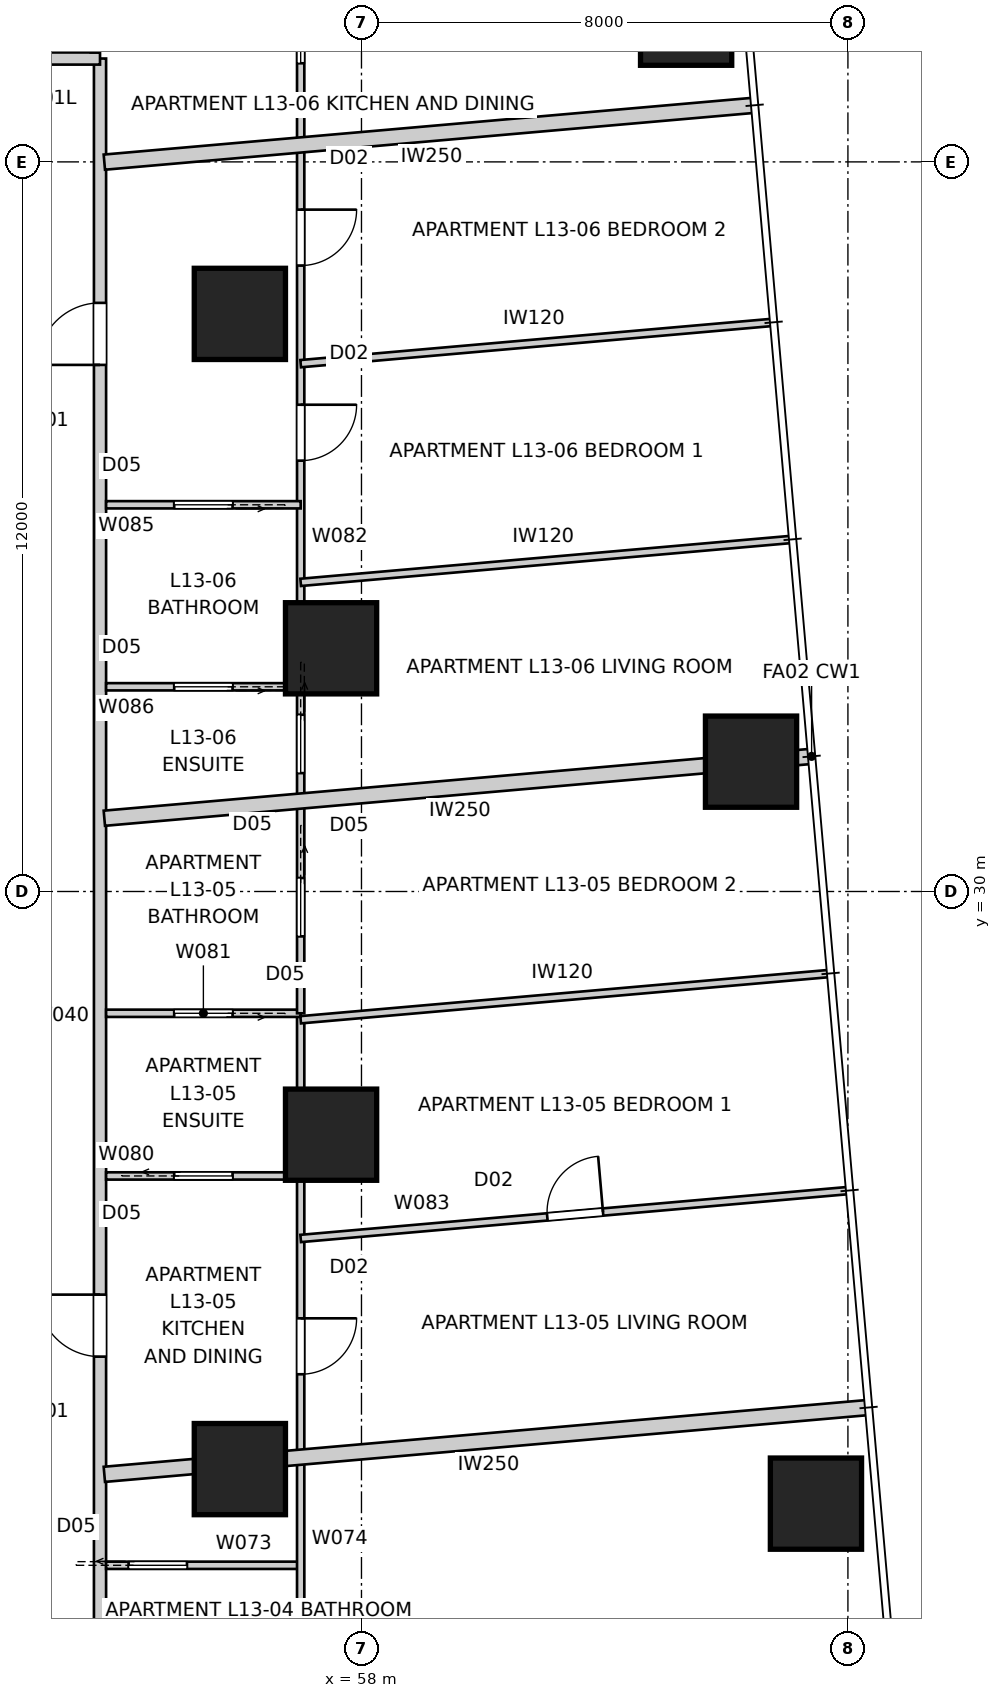
"""IFC4 building model, lengths in metres.
Left out: names, types, materials, properties, quantities, classifications, styles, units other than length and angle.
Written with IfcOpenShell. Run it as: python <this file> out.ifc"""

import sys

from ifc_helpers import new_model, si_unit, direction, frame, frame_2d, origin, origin_2d, place, context, subcontext, project, spatial, rectangle, extrude, element, fill, save


model = new_model("IFC4")
c1 = context("Model", 3, precision=1e-05, world=origin(), true_north=direction((0.0, 1.0)))
c2 = subcontext(c1, "Body", "Model", "MODEL_VIEW")
j1 = project(units=[si_unit("LENGTHUNIT", "METRE"), si_unit("PLANEANGLEUNIT", "RADIAN")], contexts=[c1])
p1 = place(None, origin())
s1 = spatial("IfcSite", under=j1, at=p1, CompositionType="ELEMENT")
p2 = place(p1, origin())
s2 = spatial("IfcBuilding", under=s1, at=p2, CompositionType="ELEMENT")
p3 = place(p2, frame((0.0, 0.0, 50.6)))
s3 = spatial("IfcBuildingStorey", under=s2, at=p3, CompositionType="ELEMENT", Elevation=50.6)
for number, where, z_axis, x_axis in (
    (1, (65.474, 19.932, 0.0), (0.0, 0.0, 1.0), (1.0, 0.0, 0.0)),
    (2, (64.407, 32.135, 0.0), (0.0, 0.0, 1.0), (1.0, 0.0, 0.0)),
    (3, (63.339, 44.339, 0.0), (0.0, 0.0, 1.0), (1.0, 0.0, 0.0)),
    (4, (57.5, 26.0, 0.0), (0.0, 0.0, 1.0), (1.0, 0.0, 0.0)),
    (5, (57.5, 34.0, 0.0), (0.0, 0.0, 1.0), (1.0, 0.0, 0.0)),
    (6, (56.0, 39.5, 0.0), (0.0, 0.0, 1.0), (1.0, 0.0, 0.0)),
    (7, (56.0, 20.5, 0.0), (0.0, 0.0, 1.0), (1.0, 0.0, 0.0)),
):
    element("IfcColumn", number, at=place(p3, frame(where, z_axis=z_axis, x_axis=x_axis)), inside=s3, PredefinedType="COLUMN", context=c2, shape_type="SweptSolid", body=[
        extrude(rectangle(XDim=1.5, YDim=1.5, at=origin_2d()), origin(), (0.0, 0.0, 1.0), 3.4),
    ])
p4 = place(p3, frame((53.7, 15.5, 0.0), z_axis=(0.0, 0.0, 1.0), x_axis=(0.0, 1.0, 0.0)))
e8 = element("IfcWall", 8, at=p4, inside=s3, PredefinedType="PARTITIONING", context=c2, shape_type="SweptSolid", body=[
    extrude(rectangle(XDim=28.2, YDim=0.2, at=frame_2d((14.1, 0.0))), origin(), (0.0, 0.0, 1.0), 3.25),
])
p5 = place(p4, frame((23.161, 0.0, 0.0)))
e9 = element("IfcOpeningElement", 9, at=p5, cuts=e8, PredefinedType="OPENING", context=c2, shape_type="SweptSolid", body=[
    extrude(rectangle(XDim=1.02, YDim=2.34, at=frame_2d((0.51, 1.17))), frame((0.0, 0.11, 0.0), z_axis=(0.0, -1.0, 0.0), x_axis=(1.0, 0.0, 0.0)), (0.0, 0.0, 1.0), 0.22),
])
p6 = place(p4, frame((6.85, 0.0, 0.0)))
e10 = element("IfcOpeningElement", 10, at=p6, cuts=e8, PredefinedType="OPENING", context=c2, shape_type="SweptSolid", body=[
    extrude(rectangle(XDim=1.02, YDim=2.34, at=frame_2d((0.51, 1.17))), frame((0.0, 0.11, 0.0), z_axis=(0.0, -1.0, 0.0), x_axis=(1.0, 0.0, 0.0)), (0.0, 0.0, 1.0), 0.22),
])
p7 = place(p3, frame((53.7, 43.7, 0.0), z_axis=(0.0, 0.0, 1.0), x_axis=(-1.0, 0.0, 0.0)))
e11 = element("IfcWall", 11, at=p7, inside=s3, PredefinedType="PARTITIONING", context=c2, shape_type="SweptSolid", body=[
    extrude(rectangle(XDim=28.2, YDim=0.2, at=frame_2d((14.1, 0.0))), origin(), (0.0, 0.0, 1.0), 3.25),
])
p8 = place(p7, frame((6.194, 0.0, 0.0)))
e12 = element("IfcOpeningElement", 12, at=p8, cuts=e11, PredefinedType="OPENING", context=c2, shape_type="SweptSolid", body=[
    extrude(rectangle(XDim=1.02, YDim=2.34, at=frame_2d((0.51, 1.17))), frame((0.0, 0.11, 0.0), z_axis=(0.0, -1.0, 0.0), x_axis=(1.0, 0.0, 0.0)), (0.0, 0.0, 1.0), 0.22),
])
p9 = place(p7, frame((1.715, 0.0, 0.0)))
e13 = element("IfcOpeningElement", 13, at=p9, cuts=e11, PredefinedType="OPENING", context=c2, shape_type="SweptSolid", body=[
    extrude(rectangle(XDim=1.02, YDim=2.1, at=frame_2d((0.51, 1.05))), frame((0.0, 0.11, 0.0), z_axis=(0.0, -1.0, 0.0), x_axis=(1.0, 0.0, 0.0)), (0.0, 0.0, 1.0), 0.22),
])
p10 = place(p7, frame((16.215, 0.0, 0.0)))
e14 = element("IfcOpeningElement", 14, at=p10, cuts=e11, PredefinedType="OPENING", context=c2, shape_type="SweptSolid", body=[
    extrude(rectangle(XDim=1.02, YDim=2.34, at=frame_2d((0.51, 1.17))), frame((0.0, 0.11, 0.0), z_axis=(0.0, -1.0, 0.0), x_axis=(1.0, 0.0, 0.0)), (0.0, 0.0, 1.0), 0.22),
])
p11 = place(p7, frame((26.255, 0.0, 0.0)))
e15 = element("IfcOpeningElement", 15, at=p11, cuts=e11, PredefinedType="OPENING", context=c2, shape_type="SweptSolid", body=[
    extrude(rectangle(XDim=1.02, YDim=2.34, at=frame_2d((0.51, 1.17))), frame((0.0, 0.11, 0.0), z_axis=(0.0, -1.0, 0.0), x_axis=(1.0, 0.0, 0.0)), (0.0, 0.0, 1.0), 0.22),
])
p12 = place(p3, frame((65.403, 32.222, 0.0), z_axis=(0.0, 0.0, 1.0), x_axis=(-0.996195419442, -0.087147497287, 0.0)))
e16 = element("IfcWall", 16, at=p12, inside=s3, PredefinedType="PARTITIONING", context=c2, shape_type="SweptSolid", body=[
    extrude(rectangle(XDim=11.677, YDim=0.25, at=frame_2d((5.838, 0.0))), origin(), (0.0, 0.0, 1.0), 3.25),
])
p13 = place(p3, frame((66.34, 21.513, 0.0), z_axis=(0.0, 0.0, 1.0), x_axis=(-0.996194851608, -0.087153988028, 0.0)))
e17 = element("IfcWall", 17, at=p13, inside=s3, PredefinedType="PARTITIONING", context=c2, shape_type="SweptSolid", body=[
    extrude(rectangle(XDim=12.617, YDim=0.25, at=frame_2d((6.309, 0.0))), origin(), (0.0, 0.0, 1.0), 3.25),
])
p14 = place(p3, frame((64.466, 42.932, 0.0), z_axis=(0.0, 0.0, 1.0), x_axis=(-0.996193939644, -0.08716441141, 0.0)))
e18 = element("IfcWall", 18, at=p14, inside=s3, PredefinedType="PARTITIONING", context=c2, shape_type="SweptSolid", body=[
    extrude(rectangle(XDim=10.736, YDim=0.25, at=frame_2d((5.368, 0.0))), origin(), (0.0, 0.0, 1.0), 3.25),
])
p15 = place(p3, frame((53.8, 18.918, 0.0), z_axis=(0.0, 0.0, 1.0), x_axis=(1.0, 0.0, 0.0)))
e19 = element("IfcWall", 19, at=p15, inside=s3, PredefinedType="PARTITIONING", context=c2, shape_type="SweptSolid", body=[
    extrude(rectangle(XDim=3.2, YDim=0.12, at=frame_2d((1.6, 0.0))), origin(), (0.0, 0.0, 1.0), 3.25),
])
p16 = place(p15, frame((0.37, 0.0, 0.0)))
e20 = element("IfcOpeningElement", 20, at=p16, cuts=e19, PredefinedType="OPENING", context=c2, shape_type="SweptSolid", body=[
    extrude(rectangle(XDim=0.96, YDim=2.1, at=frame_2d((0.48, 1.05))), frame((0.0, 0.07, 0.0), z_axis=(0.0, -1.0, 0.0), x_axis=(1.0, 0.0, 0.0)), (0.0, 0.0, 1.0), 0.14),
])
p17 = place(p3, frame((57.0, 27.94, 0.0), z_axis=(0.0, 0.0, 1.0), x_axis=(0.0, -1.0, 0.0)))
e21 = element("IfcWall", 21, at=p17, inside=s3, PredefinedType="PARTITIONING", context=c2, shape_type="SweptSolid", body=[
    extrude(rectangle(XDim=14.94, YDim=0.12, at=frame_2d((7.47, 0.0))), origin(), (0.0, 0.0, 1.0), 2.55),
])
p18 = place(p17, frame((4.961, 0.0, 0.0)))
e22 = element("IfcOpeningElement", 22, at=p18, cuts=e21, PredefinedType="OPENING", context=c2, shape_type="SweptSolid", body=[
    extrude(rectangle(XDim=0.92, YDim=2.34, at=frame_2d((0.46, 1.17))), frame((0.0, 0.07, 0.0), z_axis=(0.0, -1.0, 0.0), x_axis=(1.0, 0.0, 0.0)), (0.0, 0.0, 1.0), 0.14),
])
p19 = place(p17, frame((11.296, 0.0, 0.0)))
e23 = element("IfcOpeningElement", 23, at=p19, cuts=e21, PredefinedType="OPENING", context=c2, shape_type="SweptSolid", body=[
    extrude(rectangle(XDim=0.92, YDim=2.34, at=frame_2d((0.46, 1.17))), frame((0.0, 0.07, 0.0), z_axis=(0.0, -1.0, 0.0), x_axis=(1.0, 0.0, 0.0)), (0.0, 0.0, 1.0), 0.14),
])
p20 = place(p3, frame((53.8, 25.322, 0.0), z_axis=(0.0, 0.0, 1.0), x_axis=(1.0, 0.0, 0.0)))
e24 = element("IfcWall", 24, at=p20, inside=s3, PredefinedType="PARTITIONING", context=c2, shape_type="SweptSolid", body=[
    extrude(rectangle(XDim=3.2, YDim=0.12, at=frame_2d((1.6, 0.0))), origin(), (0.0, 0.0, 1.0), 3.25),
])
p21 = place(p20, frame((1.12, 0.0, 0.0)))
e25 = element("IfcOpeningElement", 25, at=p21, cuts=e24, PredefinedType="OPENING", context=c2, shape_type="SweptSolid", body=[
    extrude(rectangle(XDim=0.96, YDim=2.1, at=frame_2d((0.48, 1.05))), frame((0.0, 0.07, 0.0), z_axis=(0.0, -1.0, 0.0), x_axis=(1.0, 0.0, 0.0)), (0.0, 0.0, 1.0), 0.14),
])
p22 = place(p3, frame((57.0, 27.997, 0.0), z_axis=(0.0, 0.0, 1.0), x_axis=(-1.0, 0.0, 0.0)))
e26 = element("IfcWall", 26, at=p22, inside=s3, PredefinedType="PARTITIONING", context=c2, shape_type="SweptSolid", body=[
    extrude(rectangle(XDim=3.2, YDim=0.12, at=frame_2d((1.6, 0.0))), origin(), (0.0, 0.0, 1.0), 3.25),
])
p23 = place(p22, frame((1.12, 0.0, 0.0)))
e27 = element("IfcOpeningElement", 27, at=p23, cuts=e26, PredefinedType="OPENING", context=c2, shape_type="SweptSolid", body=[
    extrude(rectangle(XDim=0.96, YDim=2.1, at=frame_2d((0.48, 1.05))), frame((0.0, 0.07, 0.0), z_axis=(0.0, -1.0, 0.0), x_axis=(1.0, 0.0, 0.0)), (0.0, 0.0, 1.0), 0.14),
])
p24 = place(p3, frame((57.0, 47.0, 0.0), z_axis=(0.0, 0.0, 1.0), x_axis=(0.0, -1.0, 0.0)))
e28 = element("IfcWall", 28, at=p24, inside=s3, PredefinedType="PARTITIONING", context=c2, shape_type="SweptSolid", body=[
    extrude(rectangle(XDim=19.003, YDim=0.12, at=frame_2d((9.501, 0.0))), origin(), (0.0, 0.0, 1.0), 2.55),
])
p25 = place(p24, frame((5.785, 0.0, 0.0)))
e29 = element("IfcOpeningElement", 29, at=p25, cuts=e28, PredefinedType="OPENING", context=c2, shape_type="SweptSolid", body=[
    extrude(rectangle(XDim=0.92, YDim=2.34, at=frame_2d((0.46, 1.17))), frame((0.0, 0.07, 0.0), z_axis=(0.0, -1.0, 0.0), x_axis=(1.0, 0.0, 0.0)), (0.0, 0.0, 1.0), 0.14),
])
p26 = place(p24, frame((8.994, 0.0, 0.0)))
e30 = element("IfcOpeningElement", 30, at=p26, cuts=e28, PredefinedType="OPENING", context=c2, shape_type="SweptSolid", body=[
    extrude(rectangle(XDim=0.92, YDim=2.34, at=frame_2d((0.46, 1.17))), frame((0.0, 0.07, 0.0), z_axis=(0.0, -1.0, 0.0), x_axis=(1.0, 0.0, 0.0)), (0.0, 0.0, 1.0), 0.14),
])
p27 = place(p24, frame((2.418, 0.0, 0.0)))
e31 = element("IfcOpeningElement", 31, at=p27, cuts=e28, PredefinedType="OPENING", context=c2, shape_type="SweptSolid", body=[
    extrude(rectangle(XDim=0.96, YDim=2.1, at=frame_2d((0.48, 1.05))), frame((0.0, 0.07, 0.0), z_axis=(0.0, -1.0, 0.0), x_axis=(1.0, 0.0, 0.0)), (0.0, 0.0, 1.0), 0.14),
])
p28 = place(p24, frame((14.093, 0.0, 0.0)))
e32 = element("IfcOpeningElement", 32, at=p28, cuts=e28, PredefinedType="OPENING", context=c2, shape_type="SweptSolid", body=[
    extrude(rectangle(XDim=0.96, YDim=2.1, at=frame_2d((0.48, 1.05))), frame((0.0, 0.07, 0.0), z_axis=(0.0, -1.0, 0.0), x_axis=(1.0, 0.0, 0.0)), (0.0, 0.0, 1.0), 0.14),
])
p29 = place(p24, frame((16.778, 0.0, 0.0)))
e33 = element("IfcOpeningElement", 33, at=p29, cuts=e28, PredefinedType="OPENING", context=c2, shape_type="SweptSolid", body=[
    extrude(rectangle(XDim=0.96, YDim=2.1, at=frame_2d((0.48, 1.05))), frame((0.0, 0.07, 0.0), z_axis=(0.0, -1.0, 0.0), x_axis=(1.0, 0.0, 0.0)), (0.0, 0.0, 1.0), 0.14),
])
p30 = place(p3, frame((57.0, 24.293, 0.0), z_axis=(0.0, 0.0, 1.0), x_axis=(0.996194246178, 0.087160907995, 0.0)))
e34 = element("IfcWall", 34, at=p30, inside=s3, PredefinedType="PARTITIONING", context=c2, shape_type="SweptSolid", body=[
    extrude(rectangle(XDim=9.022, YDim=0.12, at=frame_2d((4.511, 0.0))), origin(), (0.0, 0.0, 1.0), 3.25),
])
p31 = place(p30, frame((4.071, 0.0, 0.0)))
e35 = element("IfcOpeningElement", 35, at=p31, cuts=e34, PredefinedType="OPENING", context=c2, shape_type="SweptSolid", body=[
    extrude(rectangle(XDim=0.92, YDim=2.34, at=frame_2d((0.46, 1.17))), frame((0.0, 0.07, 0.0), z_axis=(0.0, -1.0, 0.0), x_axis=(1.0, 0.0, 0.0)), (0.0, 0.0, 1.0), 0.14),
])
p32 = place(p3, frame((57.0, 27.89, 0.0), z_axis=(0.0, 0.0, 1.0), x_axis=(0.996194478193, 0.087158256162, 0.0)))
e36 = element("IfcWall", 36, at=p32, inside=s3, PredefinedType="PARTITIONING", context=c2, shape_type="SweptSolid", body=[
    extrude(rectangle(XDim=8.709, YDim=0.12, at=frame_2d((4.354, 0.0))), origin(), (0.0, 0.0, 1.0), 3.25),
])
p33 = place(p3, frame((57.0, 36.36, 0.0), z_axis=(0.0, 0.0, 1.0), x_axis=(-1.0, 0.0, 0.0)))
e37 = element("IfcWall", 37, at=p33, inside=s3, PredefinedType="PARTITIONING", context=c2, shape_type="SweptSolid", body=[
    extrude(rectangle(XDim=3.2, YDim=0.12, at=frame_2d((1.6, 0.0))), origin(), (0.0, 0.0, 1.0), 3.25),
])
p34 = place(p33, frame((1.12, 0.0, 0.0)))
e38 = element("IfcOpeningElement", 38, at=p34, cuts=e37, PredefinedType="OPENING", context=c2, shape_type="SweptSolid", body=[
    extrude(rectangle(XDim=0.96, YDim=2.1, at=frame_2d((0.48, 1.05))), frame((0.0, 0.07, 0.0), z_axis=(0.0, -1.0, 0.0), x_axis=(1.0, 0.0, 0.0)), (0.0, 0.0, 1.0), 0.14),
])
p35 = place(p3, frame((57.0, 33.367, 0.0), z_axis=(0.0, 0.0, 1.0), x_axis=(-1.0, 0.0, 0.0)))
e39 = element("IfcWall", 39, at=p35, inside=s3, PredefinedType="PARTITIONING", context=c2, shape_type="SweptSolid", body=[
    extrude(rectangle(XDim=3.2, YDim=0.12, at=frame_2d((1.6, 0.0))), origin(), (0.0, 0.0, 1.0), 3.25),
])
p36 = place(p35, frame((1.12, 0.0, 0.0)))
e40 = element("IfcOpeningElement", 40, at=p36, cuts=e39, PredefinedType="OPENING", context=c2, shape_type="SweptSolid", body=[
    extrude(rectangle(XDim=0.96, YDim=2.1, at=frame_2d((0.48, 1.05))), frame((0.0, 0.07, 0.0), z_axis=(0.0, -1.0, 0.0), x_axis=(1.0, 0.0, 0.0)), (0.0, 0.0, 1.0), 0.14),
])
p37 = place(p3, frame((57.0, 35.084, 0.0), z_axis=(0.0, 0.0, 1.0), x_axis=(0.99619214338, 0.087184938313, 0.0)))
e41 = element("IfcWall", 41, at=p37, inside=s3, PredefinedType="PARTITIONING", context=c2, shape_type="SweptSolid", body=[
    extrude(rectangle(XDim=8.082, YDim=0.12, at=frame_2d((4.041, 0.0))), origin(), (0.0, 0.0, 1.0), 3.25),
])
p38 = place(p3, frame((57.0, 38.681, 0.0), z_axis=(0.0, 0.0, 1.0), x_axis=(0.996195047824, 0.0871517452, 0.0)))
e42 = element("IfcWall", 42, at=p38, inside=s3, PredefinedType="PARTITIONING", context=c2, shape_type="SweptSolid", body=[
    extrude(rectangle(XDim=7.768, YDim=0.12, at=frame_2d((3.884, 0.0))), origin(), (0.0, 0.0, 1.0), 3.25),
])
p39 = place(p3, frame((53.606, 47.0, 0.0), z_axis=(0.0, 0.0, 1.0), x_axis=(0.0, -1.0, 0.0)))
e43 = element("IfcWall", 43, at=p39, inside=s3, PredefinedType="PARTITIONING", context=c2, shape_type="SweptSolid", body=[
    extrude(rectangle(XDim=3.2, YDim=0.12, at=frame_2d((1.6, 0.0))), origin(), (0.0, 0.0, 1.0), 3.25),
])
p40 = place(p39, frame((1.12, 0.0, 0.0)))
e44 = element("IfcOpeningElement", 44, at=p40, cuts=e43, PredefinedType="OPENING", context=c2, shape_type="SweptSolid", body=[
    extrude(rectangle(XDim=0.96, YDim=2.1, at=frame_2d((0.48, 1.05))), frame((0.0, 0.07, 0.0), z_axis=(0.0, -1.0, 0.0), x_axis=(1.0, 0.0, 0.0)), (0.0, 0.0, 1.0), 0.14),
])
p41 = place(p5, origin())
e45 = element("IfcDoor", 45, at=p41, inside=s3, OperationType="SINGLE_SWING_LEFT", PredefinedType="DOOR", context=c2, shape_type="SweptSolid", body=[
    extrude(rectangle(XDim=1.02, YDim=2.34, at=frame_2d((0.51, 1.17))), frame((0.0, 0.025, 0.0), z_axis=(0.0, -1.0, 0.0), x_axis=(1.0, 0.0, 0.0)), (0.0, 0.0, 1.0), 0.05),
])
fill(e9, e45)
p42 = place(p6, origin())
e46 = element("IfcDoor", 46, at=p42, inside=s3, OperationType="SINGLE_SWING_RIGHT", PredefinedType="DOOR", context=c2, shape_type="SweptSolid", body=[
    extrude(rectangle(XDim=1.02, YDim=2.34, at=frame_2d((0.51, 1.17))), frame((0.0, 0.025, 0.0), z_axis=(0.0, -1.0, 0.0), x_axis=(1.0, 0.0, 0.0)), (0.0, 0.0, 1.0), 0.05),
])
fill(e10, e46)
p43 = place(p25, origin())
e47 = element("IfcDoor", 47, at=p43, inside=s3, OperationType="SINGLE_SWING_LEFT", PredefinedType="DOOR", context=c2, shape_type="SweptSolid", body=[
    extrude(rectangle(XDim=0.92, YDim=2.34, at=frame_2d((0.46, 1.17))), frame((0.0, 0.025, 0.0), z_axis=(0.0, -1.0, 0.0), x_axis=(1.0, 0.0, 0.0)), (0.0, 0.0, 1.0), 0.05),
])
fill(e29, e47)
p44 = place(p34, origin())
e48 = element("IfcDoor", 48, at=p44, inside=s3, OperationType="SLIDING_TO_LEFT", PredefinedType="DOOR", context=c2, shape_type="SweptSolid", body=[
    extrude(rectangle(XDim=0.96, YDim=2.1, at=frame_2d((0.48, 1.05))), frame((0.0, 0.025, 0.0), z_axis=(0.0, -1.0, 0.0), x_axis=(1.0, 0.0, 0.0)), (0.0, 0.0, 1.0), 0.05),
])
fill(e38, e48)
p45 = place(p26, origin())
e49 = element("IfcDoor", 49, at=p45, inside=s3, OperationType="SINGLE_SWING_LEFT", PredefinedType="DOOR", context=c2, shape_type="SweptSolid", body=[
    extrude(rectangle(XDim=0.92, YDim=2.34, at=frame_2d((0.46, 1.17))), frame((0.0, 0.025, 0.0), z_axis=(0.0, -1.0, 0.0), x_axis=(1.0, 0.0, 0.0)), (0.0, 0.0, 1.0), 0.05),
])
fill(e30, e49)
p46 = place(p18, origin())
e50 = element("IfcDoor", 50, at=p46, inside=s3, OperationType="SINGLE_SWING_LEFT", PredefinedType="DOOR", context=c2, shape_type="SweptSolid", body=[
    extrude(rectangle(XDim=0.92, YDim=2.34, at=frame_2d((0.46, 1.17))), frame((0.0, 0.025, 0.0), z_axis=(0.0, -1.0, 0.0), x_axis=(1.0, 0.0, 0.0)), (0.0, 0.0, 1.0), 0.05),
])
fill(e22, e50)
p47 = place(p21, origin())
e51 = element("IfcDoor", 51, at=p47, inside=s3, OperationType="SLIDING_TO_LEFT", PredefinedType="DOOR", context=c2, shape_type="SweptSolid", body=[
    extrude(rectangle(XDim=0.96, YDim=2.1, at=frame_2d((0.48, 1.05))), frame((0.0, 0.025, 0.0), z_axis=(0.0, -1.0, 0.0), x_axis=(1.0, 0.0, 0.0)), (0.0, 0.0, 1.0), 0.05),
])
fill(e25, e51)
p48 = place(p16, origin())
e52 = element("IfcDoor", 52, at=p48, inside=s3, OperationType="SLIDING_TO_LEFT", PredefinedType="DOOR", context=c2, shape_type="SweptSolid", body=[
    extrude(rectangle(XDim=0.96, YDim=2.1, at=frame_2d((0.48, 1.05))), frame((0.0, 0.025, 0.0), z_axis=(0.0, -1.0, 0.0), x_axis=(1.0, 0.0, 0.0)), (0.0, 0.0, 1.0), 0.05),
])
fill(e20, e52)
p49 = place(p36, origin())
e53 = element("IfcDoor", 53, at=p49, inside=s3, OperationType="SLIDING_TO_LEFT", PredefinedType="DOOR", context=c2, shape_type="SweptSolid", body=[
    extrude(rectangle(XDim=0.96, YDim=2.1, at=frame_2d((0.48, 1.05))), frame((0.0, 0.025, 0.0), z_axis=(0.0, -1.0, 0.0), x_axis=(1.0, 0.0, 0.0)), (0.0, 0.0, 1.0), 0.05),
])
fill(e40, e53)
p50 = place(p31, origin())
e54 = element("IfcDoor", 54, at=p50, inside=s3, OperationType="SINGLE_SWING_RIGHT", PredefinedType="DOOR", context=c2, shape_type="SweptSolid", body=[
    extrude(rectangle(XDim=0.92, YDim=2.34, at=frame_2d((0.46, 1.17))), frame((0.0, 0.025, 0.0), z_axis=(0.0, -1.0, 0.0), x_axis=(1.0, 0.0, 0.0)), (0.0, 0.0, 1.0), 0.05),
])
fill(e35, e54)
p51 = place(p23, origin())
e55 = element("IfcDoor", 55, at=p51, inside=s3, OperationType="SLIDING_TO_LEFT", PredefinedType="DOOR", context=c2, shape_type="SweptSolid", body=[
    extrude(rectangle(XDim=0.96, YDim=2.1, at=frame_2d((0.48, 1.05))), frame((0.0, 0.025, 0.0), z_axis=(0.0, -1.0, 0.0), x_axis=(1.0, 0.0, 0.0)), (0.0, 0.0, 1.0), 0.05),
])
fill(e27, e55)
p52 = place(p27, origin())
e56 = element("IfcDoor", 56, at=p52, inside=s3, OperationType="SLIDING_TO_LEFT", PredefinedType="DOOR", context=c2, shape_type="SweptSolid", body=[
    extrude(rectangle(XDim=0.96, YDim=2.1, at=frame_2d((0.48, 1.05))), frame((0.0, 0.025, 0.0), z_axis=(0.0, -1.0, 0.0), x_axis=(1.0, 0.0, 0.0)), (0.0, 0.0, 1.0), 0.05),
])
fill(e31, e56)
p53 = place(p28, origin())
e57 = element("IfcDoor", 57, at=p53, inside=s3, OperationType="SLIDING_TO_LEFT", PredefinedType="DOOR", context=c2, shape_type="SweptSolid", body=[
    extrude(rectangle(XDim=0.96, YDim=2.1, at=frame_2d((0.48, 1.05))), frame((0.0, 0.025, 0.0), z_axis=(0.0, -1.0, 0.0), x_axis=(1.0, 0.0, 0.0)), (0.0, 0.0, 1.0), 0.05),
])
fill(e32, e57)
p54 = place(p29, origin())
e58 = element("IfcDoor", 58, at=p54, inside=s3, OperationType="SLIDING_TO_LEFT", PredefinedType="DOOR", context=c2, shape_type="SweptSolid", body=[
    extrude(rectangle(XDim=0.96, YDim=2.1, at=frame_2d((0.48, 1.05))), frame((0.0, 0.025, 0.0), z_axis=(0.0, -1.0, 0.0), x_axis=(1.0, 0.0, 0.0)), (0.0, 0.0, 1.0), 0.05),
])
fill(e33, e58)
save(model, sys.argv[1])
